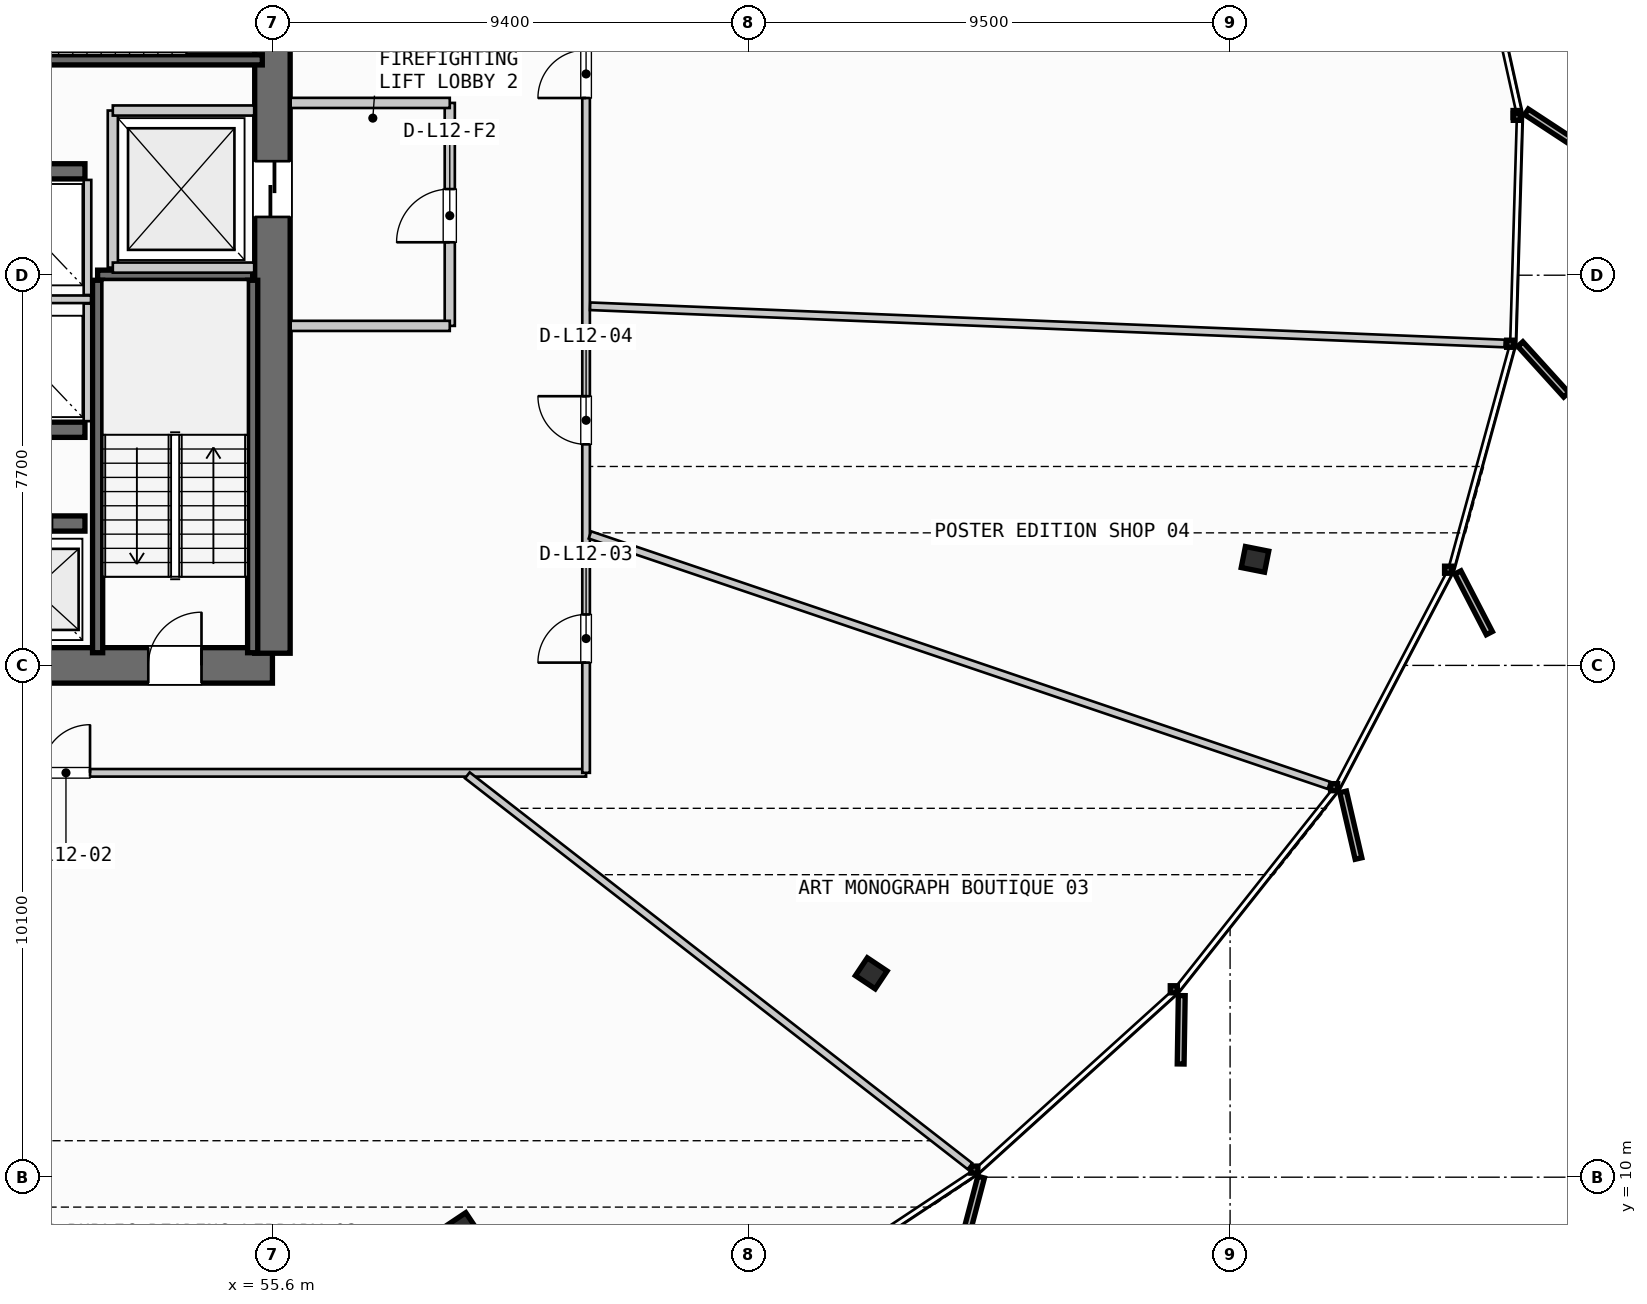
"""IFC4 building model, lengths in metres.
Left out: names, types, materials, properties, quantities, classifications, styles, units other than length and angle.
Written with IfcOpenShell. Run it as: python <this file> out.ifc"""

import sys

from ifc_helpers import new_model, si_unit, direction, frame, frame_2d, origin, origin_2d, place, context, subcontext, project, spatial, rectangle, i_section, extrude, source, transform, mapped, element, fill, save


model = new_model("IFC4")
c1 = context("Model", 3, precision=1e-05, world=origin(), true_north=direction((0.0, 1.0)))
c2 = subcontext(c1, "Body", "Model", "MODEL_VIEW")
j1 = project(units=[si_unit("LENGTHUNIT", "METRE"), si_unit("PLANEANGLEUNIT", "RADIAN")], contexts=[c1])
p1 = place(None, origin())
s1 = spatial("IfcSite", under=j1, at=p1, CompositionType="ELEMENT")
p2 = place(p1, origin())
s2 = spatial("IfcBuilding", under=s1, at=p2, CompositionType="ELEMENT")
p3 = place(p2, frame((0.0, 0.0, 52.4)))
s3 = spatial("IfcBuildingStorey", under=s2, at=p3, CompositionType="ELEMENT", Elevation=52.4)
p4 = place(p3, frame((38.0, 20.1, 0.0), z_axis=(0.0, 0.0, 1.0), x_axis=(1.0, 0.0, 0.0)))
e1 = element("IfcWall", 1, at=p4, inside=s3, PredefinedType="SHEAR", context=c2, shape_type="SweptSolid", body=[
    extrude(rectangle(XDim=17.6, YDim=0.7, at=frame_2d((8.8, 0.0))), origin(), (0.0, 0.0, 1.0), 3.55),
])
p5 = place(p4, frame((1.4, 0.0, 0.0)))
e2 = element("IfcOpeningElement", 2, at=p5, cuts=e1, PredefinedType="OPENING", context=c2, shape_type="SweptSolid", body=[
    extrude(rectangle(XDim=1.05, YDim=2.15, at=frame_2d((0.525, 1.075))), frame((0.0, 0.36, 0.0), z_axis=(0.0, -1.0, 0.0), x_axis=(1.0, 0.0, 0.0)), (0.0, 0.0, 1.0), 0.72),
])
p6 = place(p4, frame((15.15, 0.0, 0.0)))
e3 = element("IfcOpeningElement", 3, at=p6, cuts=e1, PredefinedType="OPENING", context=c2, shape_type="SweptSolid", body=[
    extrude(rectangle(XDim=1.05, YDim=2.15, at=frame_2d((0.525, 1.075))), frame((0.0, 0.36, 0.0), z_axis=(0.0, -1.0, 0.0), x_axis=(1.0, 0.0, 0.0)), (0.0, 0.0, 1.0), 0.72),
])
p7 = place(p3, frame((55.6, 20.34, 0.0), z_axis=(0.0, 0.0, 1.0), x_axis=(0.0, 1.0, 0.0)))
e4 = element("IfcWall", 4, at=p7, inside=s3, PredefinedType="SHEAR", context=c2, shape_type="SweptSolid", body=[
    extrude(rectangle(XDim=14.92, YDim=0.7, at=frame_2d((7.46, 0.0))), origin(), (0.0, 0.0, 1.0), 3.55),
])
p8 = place(p7, frame((12.71, 0.0, 0.0)))
e5 = element("IfcOpeningElement", 5, at=p8, cuts=e4, PredefinedType="OPENING", context=c2, shape_type="SweptSolid", body=[
    extrude(rectangle(XDim=1.05, YDim=2.15, at=frame_2d((0.525, 1.075))), frame((0.0, 0.36, 0.0), z_axis=(0.0, -1.0, 0.0), x_axis=(1.0, 0.0, 0.0)), (0.0, 0.0, 1.0), 0.72),
])
p9 = place(p7, frame((8.61, 0.0, 0.0)))
e6 = element("IfcOpeningElement", 6, at=p9, cuts=e4, PredefinedType="OPENING", context=c2, shape_type="SweptSolid", body=[
    extrude(rectangle(XDim=1.1, YDim=2.2, at=frame_2d((0.55, 1.1))), frame((0.0, 0.36, 0.0), z_axis=(0.0, -1.0, 0.0), x_axis=(1.0, 0.0, 0.0)), (0.0, 0.0, 1.0), 0.72),
])
p10 = place(p3, frame((47.65, 22.9, 0.0), z_axis=(0.0, 0.0, 1.0), x_axis=(1.0, 0.0, 0.0)))
e7 = element("IfcWall", 7, at=p10, inside=s3, PredefinedType="SHEAR", context=c2, shape_type="SweptSolid", body=[
    extrude(rectangle(XDim=4.25, YDim=0.3, at=frame_2d((2.125, 0.0))), origin(), (0.0, 0.0, 1.0), 3.55),
])
p11 = place(p10, frame((0.45, 0.0, 0.0)))
e8 = element("IfcOpeningElement", 8, at=p11, cuts=e7, PredefinedType="OPENING", context=c2, shape_type="SweptSolid", body=[
    extrude(rectangle(XDim=1.1, YDim=2.2, at=frame_2d((0.55, 1.1))), frame((0.0, 0.16, 0.0), z_axis=(0.0, -1.0, 0.0), x_axis=(1.0, 0.0, 0.0)), (0.0, 0.0, 1.0), 0.32),
])
p12 = place(p10, frame((2.5, 0.0, 0.0)))
e9 = element("IfcOpeningElement", 9, at=p12, cuts=e7, PredefinedType="OPENING", context=c2, shape_type="SweptSolid", body=[
    extrude(rectangle(XDim=1.1, YDim=2.2, at=frame_2d((0.55, 1.1))), frame((0.0, 0.16, 0.0), z_axis=(0.0, -1.0, 0.0), x_axis=(1.0, 0.0, 0.0)), (0.0, 0.0, 1.0), 0.32),
])
for number, where, z_axis, x_axis in (
    (10, (47.65, 24.75, 0.0), (0.0, 0.0, 1.0), (1.0, 0.0, 0.0)),
    (11, (47.65, 29.85, 0.0), (0.0, 0.0, 1.0), (1.0, 0.0, 0.0)),
):
    element("IfcWall", number, at=place(p3, frame(where, z_axis=z_axis, x_axis=x_axis)), inside=s3, PredefinedType="SHEAR", context=c2, shape_type="SweptSolid", body=[
        extrude(rectangle(XDim=4.25, YDim=0.3, at=frame_2d((2.125, 0.0))), origin(), (0.0, 0.0, 1.0), 3.55),
    ])
m1 = source(origin(), c2, "Body", "SweptSolid", [
    extrude(i_section(OverallWidth=0.423, OverallDepth=0.469, WebThickness=0.051, FlangeThickness=0.081, FilletRadius=0.015, at=origin_2d()), origin(), (0.0, 0.0, 1.0), 3.55),
])
for number, where, z_axis, x_axis in (
    (12, (59.37, 8.987, 0.0), (0.0, 0.0, 1.0), (0.556, -0.831, 0.0)),
    (13, (67.418, 14.023, 0.0), (0.0, 0.0, 1.0), (0.831, -0.556, 0.0)),
    (14, (74.991, 22.192, 0.0), (0.0, 0.0, 1.0), (0.981, -0.195, 0.0)),
):
    element("IfcColumn", number, at=place(p3, frame(where, z_axis=z_axis, x_axis=x_axis)), inside=s3, PredefinedType="COLUMN", context=c2, shape_type="MappedRepresentation", body=[
        mapped(m1, transform((0.0, 0.0, 0.0), scale=1.0)),
    ])
p13 = place(p3, frame((52.15, 27.8, 0.0), z_axis=(0.0, 0.0, 1.0), x_axis=(1.0, 0.0, 0.0)))
e15 = element("IfcWall", 15, at=p13, inside=s3, PredefinedType="SHEAR", context=c2, shape_type="SweptSolid", body=[
    extrude(rectangle(XDim=3.06, YDim=0.2, at=frame_2d((1.53, 0.0))), origin(), (0.0, 0.0, 1.0), 3.55),
])
for number, where, z_axis, x_axis in (
    (16, (55.21, 27.7, 0.0), (0.0, 0.0, 1.0), (0.0, -1.0, 0.0)),
    (17, (52.15, 20.35, 0.0), (0.0, 0.0, 1.0), (0.0, 1.0, 0.0)),
    (18, (55.4, 32.05, 0.0), (0.0, 0.0, 1.0), (-1.0, 0.0, 0.0)),
):
    element("IfcWall", number, at=place(p3, frame(where, z_axis=z_axis, x_axis=x_axis)), inside=s3, PredefinedType="SHEAR", context=c2, shape_type="SweptSolid", body=[
        extrude(rectangle(XDim=7.35, YDim=0.2, at=frame_2d((3.675, 0.0))), origin(), (0.0, 0.0, 1.0), 3.55),
    ])
p14 = place(p3, frame((52.45, 27.95, 0.0), z_axis=(0.0, 0.0, 1.0), x_axis=(0.0, 1.0, 0.0)))
e19 = element("IfcWall", 19, at=p14, inside=s3, PredefinedType="PARTITIONING", context=c2, shape_type="SweptSolid", body=[
    extrude(rectangle(XDim=3.1, YDim=0.2, at=frame_2d((1.55, 0.0))), origin(), (0.0, 0.0, 1.0), 2.645),
])
for number, where, z_axis, x_axis in (
    (20, (52.45, 27.95, 0.0), (0.0, 0.0, 1.0), (1.0, 0.0, 0.0)),
    (21, (52.45, 31.05, 0.0), (0.0, 0.0, 1.0), (1.0, 0.0, 0.0)),
):
    element("IfcWall", number, at=place(p3, frame(where, z_axis=z_axis, x_axis=x_axis)), inside=s3, PredefinedType="PARTITIONING", context=c2, shape_type="SweptSolid", body=[
        extrude(rectangle(XDim=2.79, YDim=0.2, at=frame_2d((1.395, 0.0))), origin(), (0.0, 0.0, 1.0), 2.645),
    ])
p15 = place(p3, frame((59.1, 26.8, 0.0), z_axis=(0.0, 0.0, 1.0), x_axis=(0.0, 1.0, 0.0)))
e22 = element("IfcWall", 22, at=p15, inside=s3, PredefinedType="PARTITIONING", context=c2, shape_type="SweptSolid", body=[
    extrude(rectangle(XDim=4.4, YDim=0.2, at=frame_2d((2.2, 0.0))), origin(), (0.0, 0.0, 1.0), 2.645),
])
p16 = place(p15, frame((1.65, 0.0, 0.0)))
e23 = element("IfcOpeningElement", 23, at=p16, cuts=e22, PredefinedType="OPENING", context=c2, shape_type="SweptSolid", body=[
    extrude(rectangle(XDim=1.05, YDim=2.15, at=frame_2d((0.525, 1.075))), frame((0.0, 0.11, 0.0), z_axis=(0.0, -1.0, 0.0), x_axis=(1.0, 0.0, 0.0)), (0.0, 0.0, 1.0), 0.22),
])
for number, where, z_axis, x_axis in (
    (24, (55.96, 26.8, 0.0), (0.0, 0.0, 1.0), (1.0, 0.0, 0.0)),
    (25, (55.96, 31.2, 0.0), (0.0, 0.0, 1.0), (1.0, 0.0, 0.0)),
):
    element("IfcWall", number, at=place(p3, frame(where, z_axis=z_axis, x_axis=x_axis)), inside=s3, PredefinedType="PARTITIONING", context=c2, shape_type="SweptSolid", body=[
        extrude(rectangle(XDim=3.14, YDim=0.2, at=frame_2d((1.57, 0.0))), origin(), (0.0, 0.0, 1.0), 2.645),
    ])
p17 = place(p3, frame((47.7, 27.325, 0.0), z_axis=(0.0, 0.0, 1.0), x_axis=(1.0, 0.0, 0.0)))
e26 = element("IfcWall", 26, at=p17, inside=s3, PredefinedType="PARTITIONING", context=c2, shape_type="SweptSolid", body=[
    extrude(rectangle(XDim=4.32, YDim=0.15, at=frame_2d((2.16, 0.0))), origin(), (0.0, 0.0, 1.0), 2.645),
])
p18 = place(p3, frame((51.95, 24.92, 0.0), z_axis=(0.0, 0.0, 1.0), x_axis=(0.0, 1.0, 0.0)))
e27 = element("IfcWall", 27, at=p18, inside=s3, PredefinedType="PARTITIONING", context=c2, shape_type="SweptSolid", body=[
    extrude(rectangle(XDim=2.32, YDim=0.15, at=frame_2d((1.16, 0.0))), origin(), (0.0, 0.0, 1.0), 2.645),
])
p19 = place(p3, frame((51.95, 27.41, 0.0), z_axis=(0.0, 0.0, 1.0), x_axis=(0.0, 1.0, 0.0)))
e28 = element("IfcWall", 28, at=p19, inside=s3, PredefinedType="PARTITIONING", context=c2, shape_type="SweptSolid", body=[
    extrude(rectangle(XDim=2.27, YDim=0.15, at=frame_2d((1.135, 0.0))), origin(), (0.0, 0.0, 1.0), 2.645),
])
p20 = place(p3, frame((31.81, 17.98, 0.0), z_axis=(0.0, 0.0, 1.0), x_axis=(1.0, 0.0, 0.0)))
e29 = element("IfcWall", 29, at=p20, inside=s3, PredefinedType="PARTITIONING", context=c2, shape_type="SweptSolid", body=[
    extrude(rectangle(XDim=29.98, YDim=0.15, at=frame_2d((14.99, 0.0))), origin(), (0.0, 0.0, 1.0), 2.645),
])
p21 = place(p20, frame((5.663, 0.0, 0.0)))
e30 = element("IfcOpeningElement", 30, at=p21, cuts=e29, PredefinedType="OPENING", context=c2, shape_type="SweptSolid", body=[
    extrude(rectangle(XDim=0.95, YDim=2.15, at=frame_2d((0.475, 1.075))), frame((0.0, 0.085, 0.0), z_axis=(0.0, -1.0, 0.0), x_axis=(1.0, 0.0, 0.0)), (0.0, 0.0, 1.0), 0.17),
])
p22 = place(p20, frame((19.24, 0.0, 0.0)))
e31 = element("IfcOpeningElement", 31, at=p22, cuts=e29, PredefinedType="OPENING", context=c2, shape_type="SweptSolid", body=[
    extrude(rectangle(XDim=0.95, YDim=2.15, at=frame_2d((0.475, 1.075))), frame((0.0, 0.085, 0.0), z_axis=(0.0, -1.0, 0.0), x_axis=(1.0, 0.0, 0.0)), (0.0, 0.0, 1.0), 0.17),
])
p23 = place(p3, frame((61.79, 17.98, 0.0), z_axis=(0.0, 0.0, 1.0), x_axis=(0.0, 1.0, 0.0)))
e32 = element("IfcWall", 32, at=p23, inside=s3, PredefinedType="PARTITIONING", context=c2, shape_type="SweptSolid", body=[
    extrude(rectangle(XDim=19.22, YDim=0.15, at=frame_2d((9.61, 0.0))), origin(), (0.0, 0.0, 1.0), 2.645),
])
p24 = place(p23, frame((2.175, 0.0, 0.0)))
e33 = element("IfcOpeningElement", 33, at=p24, cuts=e32, PredefinedType="OPENING", context=c2, shape_type="SweptSolid", body=[
    extrude(rectangle(XDim=0.95, YDim=2.15, at=frame_2d((0.475, 1.075))), frame((0.0, 0.085, 0.0), z_axis=(0.0, -1.0, 0.0), x_axis=(1.0, 0.0, 0.0)), (0.0, 0.0, 1.0), 0.17),
])
p25 = place(p23, frame((6.482, 0.0, 0.0)))
e34 = element("IfcOpeningElement", 34, at=p25, cuts=e32, PredefinedType="OPENING", context=c2, shape_type="SweptSolid", body=[
    extrude(rectangle(XDim=0.95, YDim=2.15, at=frame_2d((0.475, 1.075))), frame((0.0, 0.085, 0.0), z_axis=(0.0, -1.0, 0.0), x_axis=(1.0, 0.0, 0.0)), (0.0, 0.0, 1.0), 0.17),
])
p26 = place(p23, frame((13.317, 0.0, 0.0)))
e35 = element("IfcOpeningElement", 35, at=p26, cuts=e32, PredefinedType="OPENING", context=c2, shape_type="SweptSolid", body=[
    extrude(rectangle(XDim=0.95, YDim=2.15, at=frame_2d((0.475, 1.075))), frame((0.0, 0.085, 0.0), z_axis=(0.0, -1.0, 0.0), x_axis=(1.0, 0.0, 0.0)), (0.0, 0.0, 1.0), 0.17),
])
p27 = place(p3, frame((59.447, 17.931, 0.0), z_axis=(0.0, 0.0, 1.0), x_axis=(0.789361633342, -0.613928507082, 0.0)))
e36 = element("IfcWall", 36, at=p27, inside=s3, PredefinedType="PARTITIONING", context=c2, shape_type="SweptSolid", body=[
    extrude(rectangle(XDim=12.565, YDim=0.15, at=frame_2d((6.283, 0.0))), origin(), (0.0, 0.0, 1.0), 2.645),
])
p28 = place(p3, frame((61.866, 22.675, 0.0), z_axis=(0.0, 0.0, 1.0), x_axis=(0.947095534469, -0.320951785457, 0.0)))
e37 = element("IfcWall", 37, at=p28, inside=s3, PredefinedType="PARTITIONING", context=c2, shape_type="SweptSolid", body=[
    extrude(rectangle(XDim=15.398, YDim=0.15, at=frame_2d((7.699, 0.0))), origin(), (0.0, 0.0, 1.0), 2.645),
])
p29 = place(p3, frame((61.87, 27.187, 0.0), z_axis=(0.0, 0.0, 1.0), x_axis=(0.999170972955, -0.040710770123, 0.0)))
e38 = element("IfcWall", 38, at=p29, inside=s3, PredefinedType="PARTITIONING", context=c2, shape_type="SweptSolid", body=[
    extrude(rectangle(XDim=18.063, YDim=0.15, at=frame_2d((9.031, 0.0))), origin(), (0.0, 0.0, 1.0), 2.645),
])
m2 = source(origin(), c2, "Body", "SweptSolid", [
    extrude(rectangle(XDim=1.05, YDim=2.15, at=frame_2d((0.525, 1.075))), frame((0.0, 0.025, 0.0), z_axis=(0.0, -1.0, 0.0), x_axis=(1.0, 0.0, 0.0)), (0.0, 0.0, 1.0), 0.05),
])
p30 = place(p6, origin())
e39 = element("IfcDoor", 39, at=p30, inside=s3, OperationType="SINGLE_SWING_RIGHT", PredefinedType="DOOR", context=c2, shape_type="MappedRepresentation", body=[
    mapped(m2, transform((0.0, 0.0, 0.0), scale=1.0)),
])
fill(e3, e39)
m3 = source(origin(), c2, "Body", "SweptSolid", [
    extrude(rectangle(XDim=1.1, YDim=2.2, at=frame_2d((0.55, 1.1))), frame((0.0, 0.025, 0.0), z_axis=(0.0, -1.0, 0.0), x_axis=(1.0, 0.0, 0.0)), (0.0, 0.0, 1.0), 0.05),
])
p31 = place(p9, origin())
e40 = element("IfcDoor", 40, at=p31, inside=s3, OperationType="SLIDING_TO_RIGHT", PredefinedType="DOOR", context=c2, shape_type="MappedRepresentation", body=[
    mapped(m3, transform((0.0, 0.0, 0.0), scale=1.0)),
])
fill(e6, e40)
p32 = place(p16, origin())
e41 = element("IfcDoor", 41, at=p32, inside=s3, OperationType="SINGLE_SWING_LEFT", PredefinedType="DOOR", context=c2, shape_type="MappedRepresentation", body=[
    mapped(m2, transform((0.0, 0.0, 0.0), scale=1.0)),
])
fill(e23, e41)
m4 = source(origin(), c2, "Body", "SweptSolid", [
    extrude(rectangle(XDim=0.95, YDim=2.15, at=frame_2d((0.475, 1.075))), frame((0.0, 0.025, 0.0), z_axis=(0.0, -1.0, 0.0), x_axis=(1.0, 0.0, 0.0)), (0.0, 0.0, 1.0), 0.05),
])
p33 = place(p22, origin())
e42 = element("IfcDoor", 42, at=p33, inside=s3, OperationType="SINGLE_SWING_RIGHT", PredefinedType="DOOR", context=c2, shape_type="MappedRepresentation", body=[
    mapped(m4, transform((0.0, 0.0, 0.0), scale=1.0)),
])
fill(e31, e42)
p34 = place(p24, origin())
e43 = element("IfcDoor", 43, at=p34, inside=s3, OperationType="SINGLE_SWING_LEFT", PredefinedType="DOOR", context=c2, shape_type="MappedRepresentation", body=[
    mapped(m4, transform((0.0, 0.0, 0.0), scale=1.0)),
])
fill(e33, e43)
p35 = place(p25, origin())
e44 = element("IfcDoor", 44, at=p35, inside=s3, OperationType="SINGLE_SWING_RIGHT", PredefinedType="DOOR", context=c2, shape_type="MappedRepresentation", body=[
    mapped(m4, transform((0.0, 0.0, 0.0), scale=1.0)),
])
fill(e34, e44)
p36 = place(p26, origin())
e45 = element("IfcDoor", 45, at=p36, inside=s3, OperationType="SINGLE_SWING_LEFT", PredefinedType="DOOR", context=c2, shape_type="MappedRepresentation", body=[
    mapped(m4, transform((0.0, 0.0, 0.0), scale=1.0)),
])
fill(e35, e45)
save(model, sys.argv[1])
